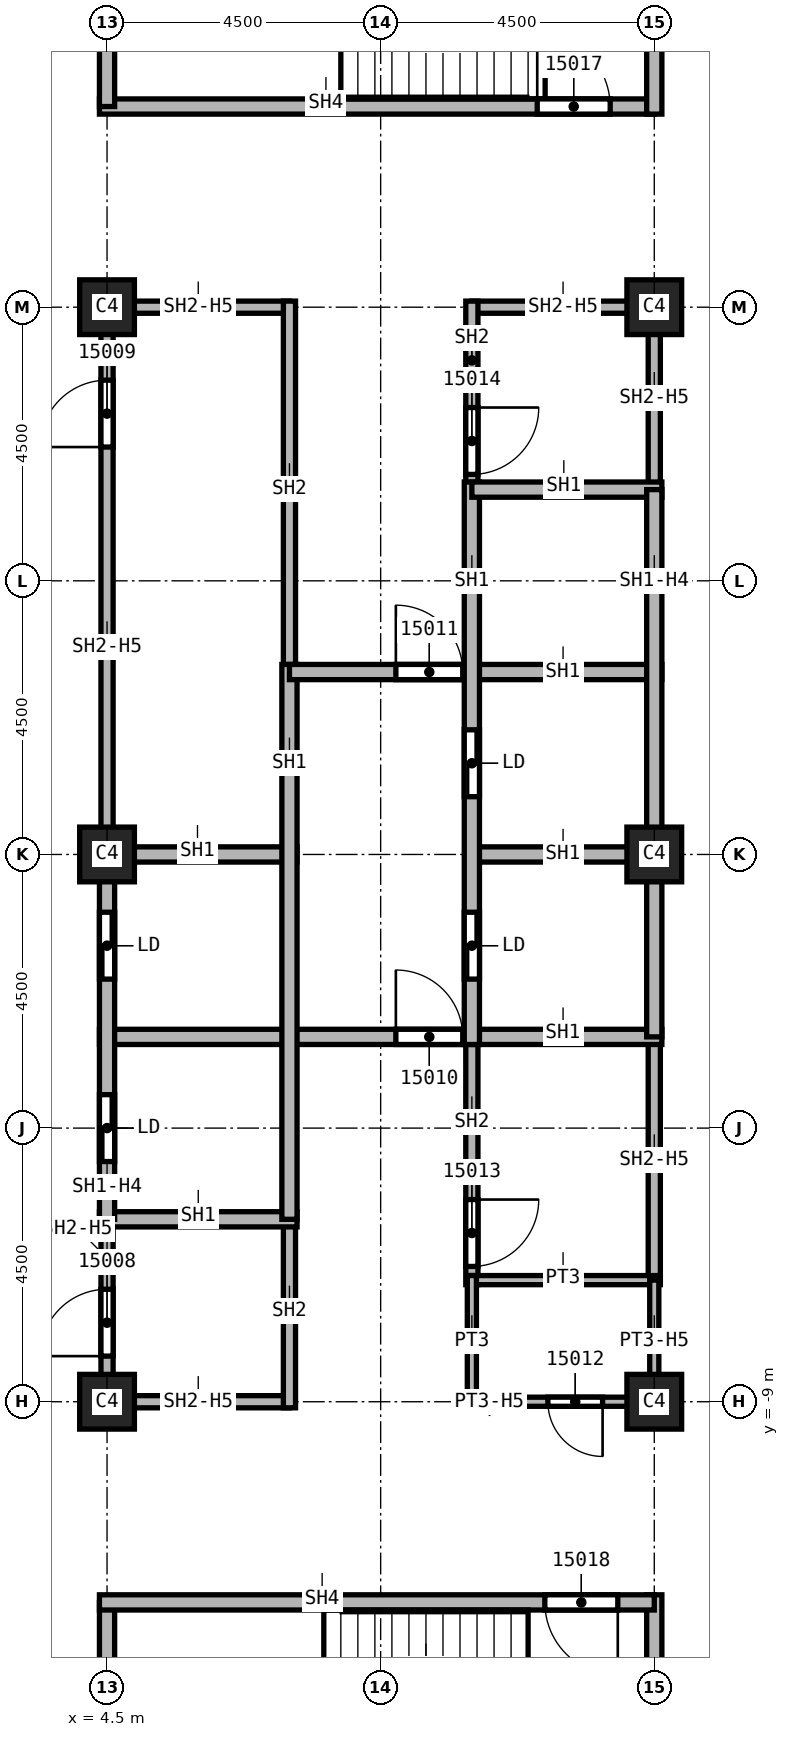
"""IFC4 building model, lengths in metres.
Left out: names, types, materials, properties, quantities, classifications, styles, units other than length and angle.
Written with IfcOpenShell. Run it as: python <this file> out.ifc"""

import sys

from ifc_helpers import new_model, si_unit, direction, frame, frame_2d, origin, origin_2d, place, context, subcontext, project, spatial, rectangle, extrude, element, fill, save


model = new_model("IFC4")
c1 = context("Model", 3, precision=1e-05, world=origin(), true_north=direction((0.0, 1.0)))
c2 = subcontext(c1, "Body", "Model", "MODEL_VIEW")
j1 = project(units=[si_unit("LENGTHUNIT", "METRE"), si_unit("PLANEANGLEUNIT", "RADIAN")], contexts=[c1])
p1 = place(None, origin())
s1 = spatial("IfcSite", under=j1, at=p1, CompositionType="ELEMENT")
p2 = place(p1, origin())
s2 = spatial("IfcBuilding", under=s1, at=p2, CompositionType="ELEMENT")
p3 = place(p2, frame((0.0, 0.0, 228.0)))
s3 = spatial("IfcBuildingStorey", under=s2, at=p3, CompositionType="ELEMENT", Elevation=228.0)
for number, where, z_axis, x_axis in (
    (1, (4.5, 0.0, 0.0), (0.0, 0.0, 1.0), (1.0, 0.0, 0.0)),
    (2, (4.5, 9.0, 0.0), (0.0, 0.0, 1.0), (1.0, 0.0, 0.0)),
    (3, (4.5, -9.0, 0.0), (0.0, 0.0, 1.0), (1.0, 0.0, 0.0)),
    (4, (13.5, 0.0, 0.0), (0.0, 0.0, 1.0), (1.0, 0.0, 0.0)),
    (5, (13.5, 9.0, 0.0), (0.0, 0.0, 1.0), (1.0, 0.0, 0.0)),
    (6, (13.5, -9.0, 0.0), (0.0, 0.0, 1.0), (1.0, 0.0, 0.0)),
):
    element("IfcColumn", number, at=place(p3, frame(where, z_axis=z_axis, x_axis=x_axis)), inside=s3, PredefinedType="COLUMN", context=c2, shape_type="SweptSolid", body=[
        extrude(rectangle(XDim=0.9, YDim=0.9, at=origin_2d()), origin(), (0.0, 0.0, 1.0), 3.72),
    ])
p4 = place(p3, frame((4.5, -9.1, 0.0), z_axis=(0.0, 0.0, 1.0), x_axis=(0.0, 1.0, 0.0)))
e7 = element("IfcWall", 7, at=p4, inside=s3, PredefinedType="SOLIDWALL", context=c2, shape_type="SweptSolid", body=[
    extrude(rectangle(XDim=3.1, YDim=0.2, at=frame_2d((1.55, 0.0))), origin(), (0.0, 0.0, 1.0), 2.958),
])
p5 = place(p4, frame((0.85, 0.0, 0.0)))
e8 = element("IfcOpeningElement", 8, at=p5, cuts=e7, PredefinedType="OPENING", context=c2, shape_type="SweptSolid", body=[
    extrude(rectangle(XDim=1.1, YDim=2.1, at=frame_2d((0.55, 1.05))), frame((0.0, 0.1, 0.0), z_axis=(0.0, -1.0, 0.0), x_axis=(1.0, 0.0, 0.0)), (0.0, 0.0, 1.0), 0.2),
])
p6 = place(p3, frame((4.5, 0.0, 0.0), z_axis=(0.0, 0.0, 1.0), x_axis=(0.0, 1.0, 0.0)))
e9 = element("IfcWall", 9, at=p6, inside=s3, PredefinedType="SOLIDWALL", context=c2, shape_type="SweptSolid", body=[
    extrude(rectangle(XDim=9.1, YDim=0.2, at=frame_2d((4.55, 0.0))), origin(), (0.0, 0.0, 1.0), 2.958),
])
p7 = place(p6, frame((6.7, 0.0, 0.0)))
e10 = element("IfcOpeningElement", 10, at=p7, cuts=e9, PredefinedType="OPENING", context=c2, shape_type="SweptSolid", body=[
    extrude(rectangle(XDim=1.1, YDim=2.1, at=frame_2d((0.55, 1.05))), frame((0.0, 0.1, 0.0), z_axis=(0.0, -1.0, 0.0), x_axis=(1.0, 0.0, 0.0)), (0.0, 0.0, 1.0), 0.2),
])
for number, where, z_axis, x_axis in (
    (11, (4.5, 9.0, 0.0), (0.0, 0.0, 1.0), (1.0, 0.0, 0.0)),
    (12, (7.5, -9.0, 0.0), (0.0, 0.0, 1.0), (-1.0, 0.0, 0.0)),
):
    element("IfcWall", number, at=place(p3, frame(where, z_axis=z_axis, x_axis=x_axis)), inside=s3, PredefinedType="SOLIDWALL", context=c2, shape_type="SweptSolid", body=[
        extrude(rectangle(XDim=3.0, YDim=0.2, at=frame_2d((1.5, 0.0))), origin(), (0.0, 0.0, 1.0), 2.958),
    ])
p8 = place(p3, frame((7.5, -6.0, 0.0), z_axis=(0.0, 0.0, 1.0), x_axis=(0.0, -1.0, 0.0)))
e13 = element("IfcWall", 13, at=p8, inside=s3, PredefinedType="SOLIDWALL", context=c2, shape_type="SweptSolid", body=[
    extrude(rectangle(XDim=3.1, YDim=0.2, at=frame_2d((1.55, 0.0))), origin(), (0.0, 0.0, 1.0), 3.72),
])
p9 = place(p3, frame((7.5, 9.1, 0.0), z_axis=(0.0, 0.0, 1.0), x_axis=(0.0, -1.0, 0.0)))
e14 = element("IfcWall", 14, at=p9, inside=s3, PredefinedType="SOLIDWALL", context=c2, shape_type="SweptSolid", body=[
    extrude(rectangle(XDim=6.225, YDim=0.2, at=frame_2d((3.113, 0.0))), origin(), (0.0, 0.0, 1.0), 3.72),
])
p10 = place(p3, frame((10.5, -2.875, 0.0), z_axis=(0.0, 0.0, 1.0), x_axis=(0.0, -1.0, 0.0)))
e15 = element("IfcWall", 15, at=p10, inside=s3, PredefinedType="SOLIDWALL", context=c2, shape_type="SweptSolid", body=[
    extrude(rectangle(XDim=4.2, YDim=0.2, at=frame_2d((2.1, 0.0))), origin(), (0.0, 0.0, 1.0), 3.72),
])
p11 = place(p10, frame((2.8, 0.0, 0.0)))
e16 = element("IfcOpeningElement", 16, at=p11, cuts=e15, PredefinedType="OPENING", context=c2, shape_type="SweptSolid", body=[
    extrude(rectangle(XDim=1.1, YDim=2.1, at=frame_2d((0.55, 1.05))), frame((0.0, 0.1, 0.0), z_axis=(0.0, -1.0, 0.0), x_axis=(1.0, 0.0, 0.0)), (0.0, 0.0, 1.0), 0.2),
])
p12 = place(p3, frame((10.5, 9.0, 0.0), z_axis=(0.0, 0.0, 1.0), x_axis=(1.0, 0.0, 0.0)))
e17 = element("IfcWall", 17, at=p12, inside=s3, PredefinedType="SOLIDWALL", context=c2, shape_type="SweptSolid", body=[
    extrude(rectangle(XDim=3.0, YDim=0.2, at=frame_2d((1.5, 0.0))), origin(), (0.0, 0.0, 1.0), 2.958),
])
p13 = place(p3, frame((10.5, 9.1, 0.0), z_axis=(0.0, 0.0, 1.0), x_axis=(0.0, -1.0, 0.0)))
e18 = element("IfcWall", 18, at=p13, inside=s3, PredefinedType="SOLIDWALL", context=c2, shape_type="SweptSolid", body=[
    extrude(rectangle(XDim=3.225, YDim=0.2, at=frame_2d((1.613, 0.0))), origin(), (0.0, 0.0, 1.0), 3.72),
])
p14 = place(p13, frame((1.75, 0.0, 0.0)))
e19 = element("IfcOpeningElement", 19, at=p14, cuts=e18, PredefinedType="OPENING", context=c2, shape_type="SweptSolid", body=[
    extrude(rectangle(XDim=1.1, YDim=2.1, at=frame_2d((0.55, 1.05))), frame((0.0, 0.1, 0.0), z_axis=(0.0, -1.0, 0.0), x_axis=(1.0, 0.0, 0.0)), (0.0, 0.0, 1.0), 0.2),
])
p15 = place(p3, frame((13.5, -3.0, 0.0), z_axis=(0.0, 0.0, 1.0), x_axis=(0.0, -1.0, 0.0)))
e20 = element("IfcWall", 20, at=p15, inside=s3, PredefinedType="SOLIDWALL", context=c2, shape_type="SweptSolid", body=[
    extrude(rectangle(XDim=4.0, YDim=0.2, at=frame_2d((2.0, 0.0))), origin(), (0.0, 0.0, 1.0), 2.958),
])
p16 = place(p3, frame((13.5, 9.1, 0.0), z_axis=(0.0, 0.0, 1.0), x_axis=(0.0, -1.0, 0.0)))
e21 = element("IfcWall", 21, at=p16, inside=s3, PredefinedType="SOLIDWALL", context=c2, shape_type="SweptSolid", body=[
    extrude(rectangle(XDim=3.1, YDim=0.2, at=frame_2d((1.55, 0.0))), origin(), (0.0, 0.0, 1.0), 2.958),
])
p17 = place(p3, frame((4.375, -6.0, 0.0), z_axis=(0.0, 0.0, 1.0), x_axis=(1.0, 0.0, 0.0)))
e22 = element("IfcWall", 22, at=p17, inside=s3, PredefinedType="SOLIDWALL", context=c2, shape_type="SweptSolid", body=[
    extrude(rectangle(XDim=3.25, YDim=0.25, at=frame_2d((1.625, 0.0))), origin(), (0.0, 0.0, 1.0), 3.72),
])
p18 = place(p3, frame((4.375, -3.0, 0.0), z_axis=(0.0, 0.0, 1.0), x_axis=(1.0, 0.0, 0.0)))
e23 = element("IfcWall", 23, at=p18, inside=s3, PredefinedType="SOLIDWALL", context=c2, shape_type="SweptSolid", body=[
    extrude(rectangle(XDim=9.25, YDim=0.25, at=frame_2d((4.625, 0.0))), origin(), (0.0, 0.0, 1.0), 3.72),
])
p19 = place(p18, frame((4.875, 0.0, 0.0)))
e24 = element("IfcOpeningElement", 24, at=p19, cuts=e23, PredefinedType="OPENING", context=c2, shape_type="SweptSolid", body=[
    extrude(rectangle(XDim=1.1, YDim=2.1, at=frame_2d((0.55, 1.05))), frame((0.0, 0.125, 0.0), z_axis=(0.0, -1.0, 0.0), x_axis=(1.0, 0.0, 0.0)), (0.0, 0.0, 1.0), 0.25),
])
p20 = place(p3, frame((4.375, 0.0, 0.0), z_axis=(0.0, 0.0, 1.0), x_axis=(1.0, 0.0, 0.0)))
e25 = element("IfcWall", 25, at=p20, inside=s3, PredefinedType="SOLIDWALL", context=c2, shape_type="SweptSolid", body=[
    extrude(rectangle(XDim=3.25, YDim=0.25, at=frame_2d((1.625, 0.0))), origin(), (0.0, 0.0, 1.0), 3.72),
])
p21 = place(p3, frame((4.5, -6.0, 0.0), z_axis=(0.0, 0.0, 1.0), x_axis=(0.0, 1.0, 0.0)))
e26 = element("IfcWall", 26, at=p21, inside=s3, PredefinedType="SOLIDWALL", context=c2, shape_type="SweptSolid", body=[
    extrude(rectangle(XDim=6.0, YDim=0.25, at=frame_2d((3.0, 0.0))), origin(), (0.0, 0.0, 1.0), 2.958),
])
p22 = place(p21, frame((0.95, 0.0, 0.0)))
e27 = element("IfcOpeningElement", 27, at=p22, cuts=e26, PredefinedType="OPENING", context=c2, shape_type="SweptSolid", body=[
    extrude(rectangle(XDim=1.1, YDim=2.1, at=frame_2d((0.55, 1.05))), frame((0.0, 0.125, 0.0), z_axis=(0.0, -1.0, 0.0), x_axis=(1.0, 0.0, 0.0)), (0.0, 0.0, 1.0), 0.25),
])
p23 = place(p21, frame((3.95, 0.0, 0.0)))
e28 = element("IfcOpeningElement", 28, at=p23, cuts=e26, PredefinedType="OPENING", context=c2, shape_type="SweptSolid", body=[
    extrude(rectangle(XDim=1.1, YDim=2.1, at=frame_2d((0.55, 1.05))), frame((0.0, 0.125, 0.0), z_axis=(0.0, -1.0, 0.0), x_axis=(1.0, 0.0, 0.0)), (0.0, 0.0, 1.0), 0.25),
])
p24 = place(p3, frame((7.5, 3.125, 0.0), z_axis=(0.0, 0.0, 1.0), x_axis=(0.0, -1.0, 0.0)))
e29 = element("IfcWall", 29, at=p24, inside=s3, PredefinedType="SOLIDWALL", context=c2, shape_type="SweptSolid", body=[
    extrude(rectangle(XDim=9.125, YDim=0.25, at=frame_2d((4.562, 0.0))), origin(), (0.0, 0.0, 1.0), 3.72),
])
p25 = place(p3, frame((7.5, 3.0, 0.0), z_axis=(0.0, 0.0, 1.0), x_axis=(1.0, 0.0, 0.0)))
e30 = element("IfcWall", 30, at=p25, inside=s3, PredefinedType="SOLIDWALL", context=c2, shape_type="SweptSolid", body=[
    extrude(rectangle(XDim=6.125, YDim=0.25, at=frame_2d((3.062, 0.0))), origin(), (0.0, 0.0, 1.0), 3.72),
])
p26 = place(p25, frame((1.75, 0.0, 0.0)))
e31 = element("IfcOpeningElement", 31, at=p26, cuts=e30, PredefinedType="OPENING", context=c2, shape_type="SweptSolid", body=[
    extrude(rectangle(XDim=1.1, YDim=2.1, at=frame_2d((0.55, 1.05))), frame((0.0, 0.125, 0.0), z_axis=(0.0, -1.0, 0.0), x_axis=(1.0, 0.0, 0.0)), (0.0, 0.0, 1.0), 0.25),
])
p27 = place(p3, frame((10.5, 0.0, 0.0), z_axis=(0.0, 0.0, 1.0), x_axis=(1.0, 0.0, 0.0)))
e32 = element("IfcWall", 32, at=p27, inside=s3, PredefinedType="SOLIDWALL", context=c2, shape_type="SweptSolid", body=[
    extrude(rectangle(XDim=3.125, YDim=0.25, at=frame_2d((1.562, 0.0))), origin(), (0.0, 0.0, 1.0), 3.72),
])
p28 = place(p3, frame((10.5, 6.125, 0.0), z_axis=(0.0, 0.0, 1.0), x_axis=(0.0, -1.0, 0.0)))
e33 = element("IfcWall", 33, at=p28, inside=s3, PredefinedType="SOLIDWALL", context=c2, shape_type="SweptSolid", body=[
    extrude(rectangle(XDim=9.25, YDim=0.25, at=frame_2d((4.625, 0.0))), origin(), (0.0, 0.0, 1.0), 3.72),
])
p29 = place(p28, frame((7.075, 0.0, 0.0)))
e34 = element("IfcOpeningElement", 34, at=p29, cuts=e33, PredefinedType="OPENING", context=c2, shape_type="SweptSolid", body=[
    extrude(rectangle(XDim=1.1, YDim=2.1, at=frame_2d((0.55, 1.05))), frame((0.0, 0.125, 0.0), z_axis=(0.0, -1.0, 0.0), x_axis=(1.0, 0.0, 0.0)), (0.0, 0.0, 1.0), 0.25),
])
p30 = place(p28, frame((4.075, 0.0, 0.0)))
e35 = element("IfcOpeningElement", 35, at=p30, cuts=e33, PredefinedType="OPENING", context=c2, shape_type="SweptSolid", body=[
    extrude(rectangle(XDim=1.1, YDim=2.1, at=frame_2d((0.55, 1.05))), frame((0.0, 0.125, 0.0), z_axis=(0.0, -1.0, 0.0), x_axis=(1.0, 0.0, 0.0)), (0.0, 0.0, 1.0), 0.25),
])
p31 = place(p3, frame((10.5, 6.0, 0.0), z_axis=(0.0, 0.0, 1.0), x_axis=(1.0, 0.0, 0.0)))
e36 = element("IfcWall", 36, at=p31, inside=s3, PredefinedType="SOLIDWALL", context=c2, shape_type="SweptSolid", body=[
    extrude(rectangle(XDim=3.125, YDim=0.25, at=frame_2d((1.562, 0.0))), origin(), (0.0, 0.0, 1.0), 3.72),
])
p32 = place(p3, frame((13.5, 6.0, 0.0), z_axis=(0.0, 0.0, 1.0), x_axis=(0.0, -1.0, 0.0)))
e37 = element("IfcWall", 37, at=p32, inside=s3, PredefinedType="SOLIDWALL", context=c2, shape_type="SweptSolid", body=[
    extrude(rectangle(XDim=9.0, YDim=0.25, at=frame_2d((4.5, 0.0))), origin(), (0.0, 0.0, 1.0), 2.958),
])
p33 = place(p3, frame((4.375, 12.3, 0.0), z_axis=(0.0, 0.0, 1.0), x_axis=(1.0, 0.0, 0.0)))
e38 = element("IfcWall", 38, at=p33, inside=s3, PredefinedType="SOLIDWALL", context=c2, shape_type="SweptSolid", body=[
    extrude(rectangle(XDim=9.125, YDim=0.25, at=frame_2d((4.562, 0.0))), origin(), (0.0, 0.0, 1.0), 3.72),
])
p34 = place(p33, frame((7.2, 0.0, 0.0)))
e39 = element("IfcOpeningElement", 39, at=p34, cuts=e38, PredefinedType="OPENING", context=c2, shape_type="SweptSolid", body=[
    extrude(rectangle(XDim=1.2, YDim=2.1, at=frame_2d((0.6, 1.05))), frame((0.0, 0.125, 0.0), z_axis=(0.0, -1.0, 0.0), x_axis=(1.0, 0.0, 0.0)), (0.0, 0.0, 1.0), 0.25),
])
for number, where, z_axis, x_axis in (
    (40, (4.5, -16.8, 0.0), (0.0, 0.0, 1.0), (0.0, 1.0, 0.0)),
    (41, (4.5, 12.3, 0.0), (0.0, 0.0, 1.0), (0.0, 1.0, 0.0)),
):
    element("IfcWall", number, at=place(p3, frame(where, z_axis=z_axis, x_axis=x_axis)), inside=s3, PredefinedType="SOLIDWALL", context=c2, shape_type="SweptSolid", body=[
        extrude(rectangle(XDim=4.5, YDim=0.25, at=frame_2d((2.25, 0.0))), origin(), (0.0, 0.0, 1.0), 3.72),
    ])
p35 = place(p3, frame((13.5, -16.925, 0.0), z_axis=(0.0, 0.0, 1.0), x_axis=(0.0, 1.0, 0.0)))
e42 = element("IfcWall", 42, at=p35, inside=s3, PredefinedType="SOLIDWALL", context=c2, shape_type="SweptSolid", body=[
    extrude(rectangle(XDim=4.75, YDim=0.25, at=frame_2d((2.375, 0.0))), origin(), (0.0, 0.0, 1.0), 3.72),
])
p36 = place(p3, frame((13.5, -12.3, 0.0), z_axis=(0.0, 0.0, 1.0), x_axis=(-1.0, 0.0, 0.0)))
e43 = element("IfcWall", 43, at=p36, inside=s3, PredefinedType="SOLIDWALL", context=c2, shape_type="SweptSolid", body=[
    extrude(rectangle(XDim=9.125, YDim=0.25, at=frame_2d((4.562, 0.0))), origin(), (0.0, 0.0, 1.0), 3.72),
])
p37 = place(p36, frame((0.6, 0.0, 0.0)))
e44 = element("IfcOpeningElement", 44, at=p37, cuts=e43, PredefinedType="OPENING", context=c2, shape_type="SweptSolid", body=[
    extrude(rectangle(XDim=1.2, YDim=2.1, at=frame_2d((0.6, 1.05))), frame((0.0, 0.125, 0.0), z_axis=(0.0, -1.0, 0.0), x_axis=(1.0, 0.0, 0.0)), (0.0, 0.0, 1.0), 0.25),
])
p38 = place(p3, frame((13.5, 12.175, 0.0), z_axis=(0.0, 0.0, 1.0), x_axis=(0.0, 1.0, 0.0)))
e45 = element("IfcWall", 45, at=p38, inside=s3, PredefinedType="SOLIDWALL", context=c2, shape_type="SweptSolid", body=[
    extrude(rectangle(XDim=4.75, YDim=0.25, at=frame_2d((2.375, 0.0))), origin(), (0.0, 0.0, 1.0), 3.72),
])
p39 = place(p3, frame((10.5, -7.0, 0.0), z_axis=(0.0, 0.0, 1.0), x_axis=(1.0, 0.0, 0.0)))
e46 = element("IfcWall", 46, at=p39, inside=s3, PredefinedType="PARTITIONING", context=c2, shape_type="SweptSolid", body=[
    extrude(rectangle(XDim=3.1, YDim=0.15, at=frame_2d((1.55, 0.0))), origin(), (0.0, 0.0, 1.0), 3.72),
])
p40 = place(p3, frame((10.5, -6.925, 0.0), z_axis=(0.0, 0.0, 1.0), x_axis=(0.0, -1.0, 0.0)))
e47 = element("IfcWall", 47, at=p40, inside=s3, PredefinedType="PARTITIONING", context=c2, shape_type="SweptSolid", body=[
    extrude(rectangle(XDim=2.15, YDim=0.15, at=frame_2d((1.075, 0.0))), origin(), (0.0, 0.0, 1.0), 3.72),
])
p41 = place(p3, frame((13.5, -9.0, 0.0), z_axis=(0.0, 0.0, 1.0), x_axis=(-1.0, 0.0, 0.0)))
e48 = element("IfcWall", 48, at=p41, inside=s3, PredefinedType="PARTITIONING", context=c2, shape_type="SweptSolid", body=[
    extrude(rectangle(XDim=3.0, YDim=0.15, at=frame_2d((1.5, 0.0))), origin(), (0.0, 0.0, 1.0), 2.958),
])
p42 = place(p41, frame((0.85, 0.0, 0.0)))
e49 = element("IfcOpeningElement", 49, at=p42, cuts=e48, PredefinedType="OPENING", context=c2, shape_type="SweptSolid", body=[
    extrude(rectangle(XDim=0.9, YDim=2.1, at=frame_2d((0.45, 1.05))), frame((0.0, 0.075, 0.0), z_axis=(0.0, -1.0, 0.0), x_axis=(1.0, 0.0, 0.0)), (0.0, 0.0, 1.0), 0.15),
])
p43 = place(p3, frame((13.5, -7.0, 0.0), z_axis=(0.0, 0.0, 1.0), x_axis=(0.0, -1.0, 0.0)))
e50 = element("IfcWall", 50, at=p43, inside=s3, PredefinedType="PARTITIONING", context=c2, shape_type="SweptSolid", body=[
    extrude(rectangle(XDim=2.075, YDim=0.15, at=frame_2d((1.038, 0.0))), origin(), (0.0, 0.0, 1.0), 2.958),
])
p44 = place(p5, origin())
e51 = element("IfcDoor", 51, at=p44, inside=s3, OperationType="SINGLE_SWING_LEFT", PredefinedType="DOOR", context=c2, shape_type="SweptSolid", body=[
    extrude(rectangle(XDim=1.1, YDim=2.1, at=frame_2d((0.55, 1.05))), frame((0.0, 0.025, 0.0), z_axis=(0.0, -1.0, 0.0), x_axis=(1.0, 0.0, 0.0)), (0.0, 0.0, 1.0), 0.05),
])
fill(e8, e51)
p45 = place(p7, origin())
e52 = element("IfcDoor", 52, at=p45, inside=s3, OperationType="SINGLE_SWING_RIGHT", PredefinedType="DOOR", context=c2, shape_type="SweptSolid", body=[
    extrude(rectangle(XDim=1.1, YDim=2.1, at=frame_2d((0.55, 1.05))), frame((0.0, 0.025, 0.0), z_axis=(0.0, -1.0, 0.0), x_axis=(1.0, 0.0, 0.0)), (0.0, 0.0, 1.0), 0.05),
])
fill(e10, e52)
p46 = place(p19, origin())
e53 = element("IfcDoor", 53, at=p46, inside=s3, OperationType="SINGLE_SWING_LEFT", PredefinedType="DOOR", context=c2, shape_type="SweptSolid", body=[
    extrude(rectangle(XDim=1.1, YDim=2.1, at=frame_2d((0.55, 1.05))), frame((0.0, 0.025, 0.0), z_axis=(0.0, -1.0, 0.0), x_axis=(1.0, 0.0, 0.0)), (0.0, 0.0, 1.0), 0.05),
])
fill(e24, e53)
p47 = place(p26, origin())
e54 = element("IfcDoor", 54, at=p47, inside=s3, OperationType="SINGLE_SWING_RIGHT", PredefinedType="DOOR", context=c2, shape_type="SweptSolid", body=[
    extrude(rectangle(XDim=1.1, YDim=2.1, at=frame_2d((0.55, 1.05))), frame((0.0, 0.025, 0.0), z_axis=(0.0, -1.0, 0.0), x_axis=(1.0, 0.0, 0.0)), (0.0, 0.0, 1.0), 0.05),
])
fill(e31, e54)
p48 = place(p42, origin())
e55 = element("IfcDoor", 55, at=p48, inside=s3, OperationType="SINGLE_SWING_LEFT", PredefinedType="DOOR", context=c2, shape_type="SweptSolid", body=[
    extrude(rectangle(XDim=0.9, YDim=2.1, at=frame_2d((0.45, 1.05))), frame((0.0, 0.025, 0.0), z_axis=(0.0, -1.0, 0.0), x_axis=(1.0, 0.0, 0.0)), (0.0, 0.0, 1.0), 0.05),
])
fill(e49, e55)
p49 = place(p11, origin())
e56 = element("IfcDoor", 56, at=p49, inside=s3, OperationType="SINGLE_SWING_RIGHT", PredefinedType="DOOR", context=c2, shape_type="SweptSolid", body=[
    extrude(rectangle(XDim=1.1, YDim=2.1, at=frame_2d((0.55, 1.05))), frame((0.0, 0.025, 0.0), z_axis=(0.0, -1.0, 0.0), x_axis=(1.0, 0.0, 0.0)), (0.0, 0.0, 1.0), 0.05),
])
fill(e16, e56)
p50 = place(p14, origin())
e57 = element("IfcDoor", 57, at=p50, inside=s3, OperationType="SINGLE_SWING_LEFT", PredefinedType="DOOR", context=c2, shape_type="SweptSolid", body=[
    extrude(rectangle(XDim=1.1, YDim=2.1, at=frame_2d((0.55, 1.05))), frame((0.0, 0.025, 0.0), z_axis=(0.0, -1.0, 0.0), x_axis=(1.0, 0.0, 0.0)), (0.0, 0.0, 1.0), 0.05),
])
fill(e19, e57)
p51 = place(p34, origin())
e58 = element("IfcDoor", 58, at=p51, inside=s3, OperationType="SINGLE_SWING_RIGHT", PredefinedType="DOOR", context=c2, shape_type="SweptSolid", body=[
    extrude(rectangle(XDim=1.2, YDim=2.1, at=frame_2d((0.6, 1.05))), frame((0.0, 0.025, 0.0), z_axis=(0.0, -1.0, 0.0), x_axis=(1.0, 0.0, 0.0)), (0.0, 0.0, 1.0), 0.05),
])
fill(e39, e58)
p52 = place(p37, origin())
e59 = element("IfcDoor", 59, at=p52, inside=s3, OperationType="SINGLE_SWING_LEFT", PredefinedType="DOOR", context=c2, shape_type="SweptSolid", body=[
    extrude(rectangle(XDim=1.2, YDim=2.1, at=frame_2d((0.6, 1.05))), frame((0.0, 0.025, 0.0), z_axis=(0.0, -1.0, 0.0), x_axis=(1.0, 0.0, 0.0)), (0.0, 0.0, 1.0), 0.05),
])
fill(e44, e59)
p53 = place(p22, origin())
e60 = element("IfcDoor", 60, at=p53, inside=s3, OperationType="SLIDING_TO_LEFT", PredefinedType="DOOR", context=c2, shape_type="SweptSolid", body=[
    extrude(rectangle(XDim=1.1, YDim=2.1, at=frame_2d((0.55, 1.05))), frame((0.0, 0.025, 0.0), z_axis=(0.0, -1.0, 0.0), x_axis=(1.0, 0.0, 0.0)), (0.0, 0.0, 1.0), 0.05),
])
fill(e27, e60)
p54 = place(p23, origin())
e61 = element("IfcDoor", 61, at=p54, inside=s3, OperationType="SLIDING_TO_LEFT", PredefinedType="DOOR", context=c2, shape_type="SweptSolid", body=[
    extrude(rectangle(XDim=1.1, YDim=2.1, at=frame_2d((0.55, 1.05))), frame((0.0, 0.025, 0.0), z_axis=(0.0, -1.0, 0.0), x_axis=(1.0, 0.0, 0.0)), (0.0, 0.0, 1.0), 0.05),
])
fill(e28, e61)
p55 = place(p29, origin())
e62 = element("IfcDoor", 62, at=p55, inside=s3, OperationType="SLIDING_TO_LEFT", PredefinedType="DOOR", context=c2, shape_type="SweptSolid", body=[
    extrude(rectangle(XDim=1.1, YDim=2.1, at=frame_2d((0.55, 1.05))), frame((0.0, 0.025, 0.0), z_axis=(0.0, -1.0, 0.0), x_axis=(1.0, 0.0, 0.0)), (0.0, 0.0, 1.0), 0.05),
])
fill(e34, e62)
p56 = place(p30, origin())
e63 = element("IfcDoor", 63, at=p56, inside=s3, OperationType="SLIDING_TO_LEFT", PredefinedType="DOOR", context=c2, shape_type="SweptSolid", body=[
    extrude(rectangle(XDim=1.1, YDim=2.1, at=frame_2d((0.55, 1.05))), frame((0.0, 0.025, 0.0), z_axis=(0.0, -1.0, 0.0), x_axis=(1.0, 0.0, 0.0)), (0.0, 0.0, 1.0), 0.05),
])
fill(e35, e63)
save(model, sys.argv[1])
